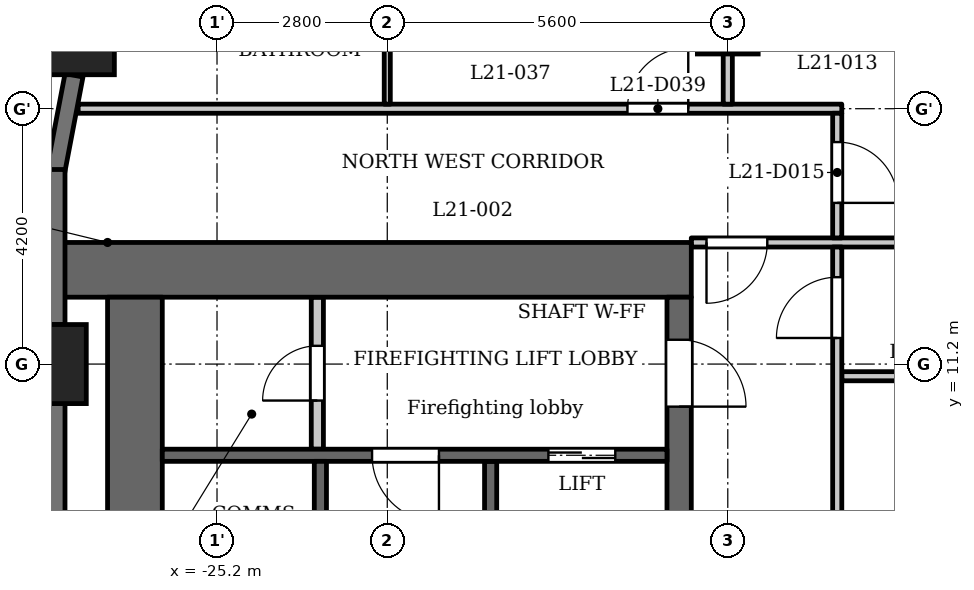
"""IFC4 building model, lengths in metres.
Left out: names, types, materials, properties, quantities, classifications, styles, units other than length and angle.
Written with IfcOpenShell. Run it as: python <this file> out.ifc"""

import sys

from ifc_helpers import new_model, si_unit, direction, frame, frame_2d, origin, origin_2d, place, context, subcontext, project, spatial, rectangle, extrude, element, fill, save


model = new_model("IFC4")
c1 = context("Model", 3, precision=1e-05, world=origin(), true_north=direction((0.0, 1.0)))
c2 = subcontext(c1, "Body", "Model", "MODEL_VIEW")
j1 = project(units=[si_unit("LENGTHUNIT", "METRE"), si_unit("PLANEANGLEUNIT", "RADIAN")], contexts=[c1])
p1 = place(None, origin())
s1 = spatial("IfcSite", under=j1, at=p1, CompositionType="ELEMENT")
p2 = place(p1, origin())
s2 = spatial("IfcBuilding", under=s1, at=p2, CompositionType="ELEMENT")
p3 = place(p2, frame((0.0, 0.0, 86.8)))
s3 = spatial("IfcBuildingStorey", under=s2, at=p3, CompositionType="ELEMENT", Elevation=86.8)
for number, where, z_axis, x_axis in (
    (1, (-27.538, 16.609, 0.0), (0.0, 0.0, 1.0), (1.0, 0.0, 0.0)),
    (2, (-28.0, 11.2, 0.0), (0.0, 0.0, 1.0), (1.0, 0.0, 0.0)),
):
    element("IfcColumn", number, at=place(p3, frame(where, z_axis=z_axis, x_axis=x_axis)), inside=s3, PredefinedType="COLUMN", context=c2, shape_type="SweptSolid", body=[
        extrude(rectangle(XDim=1.3, YDim=1.3, at=origin_2d()), origin(), (0.0, 0.0, 1.0), 3.5),
    ])
p4 = place(p3, frame((-16.8, 16.8, 0.0), z_axis=(0.0, 0.0, 1.0), x_axis=(1.0, 0.0, 0.0)))
e3 = element("IfcColumn", 3, at=p4, inside=s3, PredefinedType="COLUMN", context=c2, shape_type="SweptSolid", body=[
    extrude(rectangle(XDim=1.0, YDim=1.0, at=origin_2d()), origin(), (0.0, 0.0, 1.0), 3.5),
])
p5 = place(p3, frame((-27.552, 15.949, 0.0), z_axis=(0.0, 0.0, 1.0), x_axis=(-0.187279751651, -0.982306619453, 0.0)))
e4 = element("IfcWall", 4, at=p5, inside=s3, PredefinedType="SOLIDWALL", context=c2, shape_type="SweptSolid", body=[
    extrude(rectangle(XDim=1.606, YDim=0.3, at=frame_2d((0.803, 0.0))), origin(), (0.0, 0.0, 1.0), 2.4),
])
p6 = place(p3, frame((-27.85, 14.4, 0.0), z_axis=(0.0, 0.0, 1.0), x_axis=(0.0, -1.0, 0.0)))
e5 = element("IfcWall", 5, at=p6, inside=s3, PredefinedType="SOLIDWALL", context=c2, shape_type="SweptSolid", body=[
    extrude(rectangle(XDim=2.55, YDim=0.3, at=frame_2d((1.275, 0.0))), origin(), (0.0, 0.0, 1.0), 2.4),
])
p7 = place(p3, frame((-27.85, 10.55, 0.0), z_axis=(0.0, 0.0, 1.0), x_axis=(0.0, -1.0, 0.0)))
e6 = element("IfcWall", 6, at=p7, inside=s3, PredefinedType="SOLIDWALL", context=c2, shape_type="SweptSolid", body=[
    extrude(rectangle(XDim=4.3, YDim=0.3, at=frame_2d((2.15, 0.0))), origin(), (0.0, 0.0, 1.0), 2.4),
])
p8 = place(p3, frame((-20.7, 2.6, 0.0), z_axis=(0.0, 0.0, 1.0), x_axis=(0.0, 1.0, 0.0)))
e7 = element("IfcWall", 7, at=p8, inside=s3, PredefinedType="SHEAR", context=c2, shape_type="SweptSolid", body=[
    extrude(rectangle(XDim=7.0, YDim=0.2, at=frame_2d((3.5, 0.0))), origin(), (0.0, 0.0, 1.0), 3.2),
])
p9 = place(p3, frame((-17.4, 12.75, 0.0), z_axis=(0.0, 0.0, 1.0), x_axis=(-1.0, 0.0, 0.0)))
e8 = element("IfcWall", 8, at=p9, inside=s3, PredefinedType="SHEAR", context=c2, shape_type="SweptSolid", body=[
    extrude(rectangle(XDim=10.4, YDim=0.9, at=frame_2d((5.2, 0.0))), origin(), (0.0, 0.0, 1.0), 3.2),
])
p10 = place(p3, frame((-17.6, -12.3, 0.0), z_axis=(0.0, 0.0, 1.0), x_axis=(0.0, 1.0, 0.0)))
e9 = element("IfcWall", 9, at=p10, inside=s3, PredefinedType="SHEAR", context=c2, shape_type="SweptSolid", body=[
    extrude(rectangle(XDim=24.6, YDim=0.4, at=frame_2d((12.3, 0.0))), origin(), (0.0, 0.0, 1.0), 3.2),
])
p11 = place(p10, frame((6.0, 0.0, 0.0)))
e10 = element("IfcOpeningElement", 10, at=p11, cuts=e9, PredefinedType="OPENING", context=c2, shape_type="SweptSolid", body=[
    extrude(rectangle(XDim=1.1, YDim=2.1, at=frame_2d((0.55, 1.05))), frame((0.0, 0.21, 0.0), z_axis=(0.0, -1.0, 0.0), x_axis=(1.0, 0.0, 0.0)), (0.0, 0.0, 1.0), 0.42),
])
p12 = place(p10, frame((8.4, 0.0, 0.0)))
e11 = element("IfcOpeningElement", 11, at=p12, cuts=e9, PredefinedType="OPENING", context=c2, shape_type="SweptSolid", body=[
    extrude(rectangle(XDim=1.1, YDim=2.1, at=frame_2d((0.55, 1.05))), frame((0.0, 0.21, 0.0), z_axis=(0.0, -1.0, 0.0), x_axis=(1.0, 0.0, 0.0)), (0.0, 0.0, 1.0), 0.42),
])
p13 = place(p10, frame((10.8, 0.0, 0.0)))
e12 = element("IfcOpeningElement", 12, at=p13, cuts=e9, PredefinedType="OPENING", context=c2, shape_type="SweptSolid", body=[
    extrude(rectangle(XDim=1.1, YDim=2.1, at=frame_2d((0.55, 1.05))), frame((0.0, 0.21, 0.0), z_axis=(0.0, -1.0, 0.0), x_axis=(1.0, 0.0, 0.0)), (0.0, 0.0, 1.0), 0.42),
])
p14 = place(p10, frame((16.75, 0.0, 0.0)))
e13 = element("IfcOpeningElement", 13, at=p14, cuts=e9, PredefinedType="OPENING", context=c2, shape_type="SweptSolid", body=[
    extrude(rectangle(XDim=0.9, YDim=2.1, at=frame_2d((0.45, 1.05))), frame((0.0, 0.21, 0.0), z_axis=(0.0, -1.0, 0.0), x_axis=(1.0, 0.0, 0.0)), (0.0, 0.0, 1.0), 0.42),
])
p15 = place(p10, frame((22.8, 0.0, 0.0)))
e14 = element("IfcOpeningElement", 14, at=p15, cuts=e9, PredefinedType="OPENING", context=c2, shape_type="SweptSolid", body=[
    extrude(rectangle(XDim=1.1, YDim=2.1, at=frame_2d((0.55, 1.05))), frame((0.0, 0.21, 0.0), z_axis=(0.0, -1.0, 0.0), x_axis=(1.0, 0.0, 0.0)), (0.0, 0.0, 1.0), 0.42),
])
p16 = place(p10, frame((0.7, 0.0, 0.0)))
e15 = element("IfcOpeningElement", 15, at=p16, cuts=e9, PredefinedType="OPENING", context=c2, shape_type="SweptSolid", body=[
    extrude(rectangle(XDim=1.1, YDim=2.1, at=frame_2d((0.55, 1.05))), frame((0.0, 0.21, 0.0), z_axis=(0.0, -1.0, 0.0), x_axis=(1.0, 0.0, 0.0)), (0.0, 0.0, 1.0), 0.42),
])
p17 = place(p10, frame((12.775, 0.0, 0.0)))
e16 = element("IfcOpeningElement", 16, at=p17, cuts=e9, PredefinedType="OPENING", context=c2, shape_type="SweptSolid", body=[
    extrude(rectangle(XDim=1.8, YDim=2.1, at=frame_2d((0.9, 1.05))), frame((0.0, 0.21, 0.0), z_axis=(0.0, -1.0, 0.0), x_axis=(1.0, 0.0, 0.0)), (0.0, 0.0, 1.0), 0.42),
])
p18 = place(p3, frame((-26.55, -12.3, 0.0), z_axis=(0.0, 0.0, 1.0), x_axis=(0.0, 1.0, 0.0)))
e17 = element("IfcWall", 17, at=p18, inside=s3, PredefinedType="SHEAR", context=c2, shape_type="SweptSolid", body=[
    extrude(rectangle(XDim=24.6, YDim=0.9, at=frame_2d((12.3, 0.0))), origin(), (0.0, 0.0, 1.0), 3.2),
])
p19 = place(p3, frame((-23.55, 9.8, 0.0), z_axis=(0.0, 0.0, 1.0), x_axis=(0.0, 1.0, 0.0)))
e18 = element("IfcWall", 18, at=p19, inside=s3, PredefinedType="PARTITIONING", context=c2, shape_type="SweptSolid", body=[
    extrude(rectangle(XDim=2.5, YDim=0.2, at=frame_2d((1.25, 0.0))), origin(), (0.0, 0.0, 1.0), 3.2),
])
p20 = place(p19, frame((0.8, 0.0, 0.0)))
e19 = element("IfcOpeningElement", 19, at=p20, cuts=e18, PredefinedType="OPENING", context=c2, shape_type="SweptSolid", body=[
    extrude(rectangle(XDim=0.9, YDim=2.1, at=frame_2d((0.45, 1.05))), frame((0.0, 0.11, 0.0), z_axis=(0.0, -1.0, 0.0), x_axis=(1.0, 0.0, 0.0)), (0.0, 0.0, 1.0), 0.22),
])
p21 = place(p3, frame((-17.8, 9.7, 0.0), z_axis=(0.0, 0.0, 1.0), x_axis=(-1.0, 0.0, 0.0)))
e20 = element("IfcWall", 20, at=p21, inside=s3, PredefinedType="SHEAR", context=c2, shape_type="SweptSolid", body=[
    extrude(rectangle(XDim=8.3, YDim=0.2, at=frame_2d((4.15, 0.0))), origin(), (0.0, 0.0, 1.0), 3.2),
])
p22 = place(p21, frame((0.85, 0.0, 0.0)))
e21 = element("IfcOpeningElement", 21, at=p22, cuts=e20, PredefinedType="OPENING", context=c2, shape_type="SweptSolid", body=[
    extrude(rectangle(XDim=1.1, YDim=2.1, at=frame_2d((0.55, 1.05))), frame((0.0, 0.11, 0.0), z_axis=(0.0, -1.0, 0.0), x_axis=(1.0, 0.0, 0.0)), (0.0, 0.0, 1.0), 0.22),
])
p23 = place(p21, frame((3.75, 0.0, 0.0)))
e22 = element("IfcOpeningElement", 22, at=p23, cuts=e20, PredefinedType="OPENING", context=c2, shape_type="SweptSolid", body=[
    extrude(rectangle(XDim=1.1, YDim=2.1, at=frame_2d((0.55, 1.05))), frame((0.0, 0.11, 0.0), z_axis=(0.0, -1.0, 0.0), x_axis=(1.0, 0.0, 0.0)), (0.0, 0.0, 1.0), 0.22),
])
p24 = place(p3, frame((-23.5, 2.6, 0.0), z_axis=(0.0, 0.0, 1.0), x_axis=(0.0, 1.0, 0.0)))
e23 = element("IfcWall", 23, at=p24, inside=s3, PredefinedType="SHEAR", context=c2, shape_type="SweptSolid", body=[
    extrude(rectangle(XDim=7.0, YDim=0.2, at=frame_2d((3.5, 0.0))), origin(), (0.0, 0.0, 1.0), 3.2),
])
p25 = place(p3, frame((-14.925, 11.0, 0.0), z_axis=(0.0, 0.0, 1.0), x_axis=(1.0, 0.0, 0.0)))
e24 = element("IfcWall", 24, at=p25, inside=s3, PredefinedType="PARTITIONING", context=c2, shape_type="SweptSolid", body=[
    extrude(rectangle(XDim=29.85, YDim=0.15, at=frame_2d((14.925, 0.0))), origin(), (0.0, 0.0, 1.0), 3.2),
])
p26 = place(p25, frame((1.076, 0.0, 0.0)))
e25 = element("IfcOpeningElement", 25, at=p26, cuts=e24, PredefinedType="OPENING", context=c2, shape_type="SweptSolid", body=[
    extrude(rectangle(XDim=1.0, YDim=2.1, at=frame_2d((0.5, 1.05))), frame((0.0, 0.085, 0.0), z_axis=(0.0, -1.0, 0.0), x_axis=(1.0, 0.0, 0.0)), (0.0, 0.0, 1.0), 0.17),
])
p27 = place(p25, frame((7.625, 0.0, 0.0)))
e26 = element("IfcOpeningElement", 26, at=p27, cuts=e24, PredefinedType="OPENING", context=c2, shape_type="SweptSolid", body=[
    extrude(rectangle(XDim=1.0, YDim=2.1, at=frame_2d((0.5, 1.05))), frame((0.0, 0.085, 0.0), z_axis=(0.0, -1.0, 0.0), x_axis=(1.0, 0.0, 0.0)), (0.0, 0.0, 1.0), 0.17),
])
p28 = place(p25, frame((9.975, 0.0, 0.0)))
e27 = element("IfcOpeningElement", 27, at=p28, cuts=e24, PredefinedType="OPENING", context=c2, shape_type="SweptSolid", body=[
    extrude(rectangle(XDim=1.0, YDim=2.1, at=frame_2d((0.5, 1.05))), frame((0.0, 0.085, 0.0), z_axis=(0.0, -1.0, 0.0), x_axis=(1.0, 0.0, 0.0)), (0.0, 0.0, 1.0), 0.17),
])
p29 = place(p25, frame((18.825, 0.0, 0.0)))
e28 = element("IfcOpeningElement", 28, at=p29, cuts=e24, PredefinedType="OPENING", context=c2, shape_type="SweptSolid", body=[
    extrude(rectangle(XDim=1.0, YDim=2.1, at=frame_2d((0.5, 1.05))), frame((0.0, 0.085, 0.0), z_axis=(0.0, -1.0, 0.0), x_axis=(1.0, 0.0, 0.0)), (0.0, 0.0, 1.0), 0.17),
])
p30 = place(p25, frame((21.175, 0.0, 0.0)))
e29 = element("IfcOpeningElement", 29, at=p30, cuts=e24, PredefinedType="OPENING", context=c2, shape_type="SweptSolid", body=[
    extrude(rectangle(XDim=1.0, YDim=2.1, at=frame_2d((0.5, 1.05))), frame((0.0, 0.085, 0.0), z_axis=(0.0, -1.0, 0.0), x_axis=(1.0, 0.0, 0.0)), (0.0, 0.0, 1.0), 0.17),
])
p31 = place(p25, frame((27.775, 0.0, 0.0)))
e30 = element("IfcOpeningElement", 30, at=p31, cuts=e24, PredefinedType="OPENING", context=c2, shape_type="SweptSolid", body=[
    extrude(rectangle(XDim=1.0, YDim=2.1, at=frame_2d((0.5, 1.05))), frame((0.0, 0.085, 0.0), z_axis=(0.0, -1.0, 0.0), x_axis=(1.0, 0.0, 0.0)), (0.0, 0.0, 1.0), 0.17),
])
p32 = place(p3, frame((-17.4, 13.2, 0.0), z_axis=(0.0, 0.0, 1.0), x_axis=(1.0, 0.0, 0.0)))
e31 = element("IfcWall", 31, at=p32, inside=s3, PredefinedType="PARTITIONING", context=c2, shape_type="SweptSolid", body=[
    extrude(rectangle(XDim=34.8, YDim=0.15, at=frame_2d((17.4, 0.0))), origin(), (0.0, 0.0, 1.0), 3.2),
])
p33 = place(p32, frame((0.25, 0.0, 0.0)))
e32 = element("IfcOpeningElement", 32, at=p33, cuts=e31, PredefinedType="OPENING", context=c2, shape_type="SweptSolid", body=[
    extrude(rectangle(XDim=1.0, YDim=2.1, at=frame_2d((0.5, 1.05))), frame((0.0, 0.085, 0.0), z_axis=(0.0, -1.0, 0.0), x_axis=(1.0, 0.0, 0.0)), (0.0, 0.0, 1.0), 0.17),
])
p34 = place(p32, frame((33.65, 0.0, 0.0)))
e33 = element("IfcOpeningElement", 33, at=p34, cuts=e31, PredefinedType="OPENING", context=c2, shape_type="SweptSolid", body=[
    extrude(rectangle(XDim=1.0, YDim=2.1, at=frame_2d((0.5, 1.05))), frame((0.0, 0.085, 0.0), z_axis=(0.0, -1.0, 0.0), x_axis=(1.0, 0.0, 0.0)), (0.0, 0.0, 1.0), 0.17),
])
p35 = place(p32, frame((15.75, 0.0, 0.0)))
e34 = element("IfcOpeningElement", 34, at=p35, cuts=e31, PredefinedType="OPENING", context=c2, shape_type="SweptSolid", body=[
    extrude(rectangle(XDim=1.0, YDim=2.1, at=frame_2d((0.5, 1.05))), frame((0.0, 0.085, 0.0), z_axis=(0.0, -1.0, 0.0), x_axis=(1.0, 0.0, 0.0)), (0.0, 0.0, 1.0), 0.17),
])
p36 = place(p32, frame((21.35, 0.0, 0.0)))
e35 = element("IfcOpeningElement", 35, at=p36, cuts=e31, PredefinedType="OPENING", context=c2, shape_type="SweptSolid", body=[
    extrude(rectangle(XDim=1.0, YDim=2.1, at=frame_2d((0.5, 1.05))), frame((0.0, 0.085, 0.0), z_axis=(0.0, -1.0, 0.0), x_axis=(1.0, 0.0, 0.0)), (0.0, 0.0, 1.0), 0.17),
])
p37 = place(p3, frame((-27.484, 15.4, 0.0), z_axis=(0.0, 0.0, 1.0), x_axis=(1.0, 0.0, 0.0)))
e36 = element("IfcWall", 36, at=p37, inside=s3, PredefinedType="PARTITIONING", context=c2, shape_type="SweptSolid", body=[
    extrude(rectangle(XDim=12.559, YDim=0.15, at=frame_2d((6.279, 0.0))), origin(), (0.0, 0.0, 1.0), 3.2),
])
p38 = place(p37, frame((9.034, 0.0, 0.0)))
e37 = element("IfcOpeningElement", 37, at=p38, cuts=e36, PredefinedType="OPENING", context=c2, shape_type="SweptSolid", body=[
    extrude(rectangle(XDim=1.0, YDim=2.1, at=frame_2d((0.5, 1.05))), frame((0.0, 0.085, 0.0), z_axis=(0.0, -1.0, 0.0), x_axis=(1.0, 0.0, 0.0)), (0.0, 0.0, 1.0), 0.17),
])
p39 = place(p3, frame((-22.4, 15.475, 0.0), z_axis=(0.0, 0.0, 1.0), x_axis=(0.0, 1.0, 0.0)))
e38 = element("IfcWall", 38, at=p39, inside=s3, PredefinedType="PARTITIONING", context=c2, shape_type="SweptSolid", body=[
    extrude(rectangle(XDim=2.275, YDim=0.1, at=frame_2d((1.137, 0.0))), origin(), (0.0, 0.0, 1.0), 3.2),
])
p40 = place(p3, frame((-16.8, 15.475, 0.0), z_axis=(0.0, 0.0, 1.0), x_axis=(0.0, 1.0, 0.0)))
e39 = element("IfcWall", 39, at=p40, inside=s3, PredefinedType="PARTITIONING", context=c2, shape_type="SweptSolid", body=[
    extrude(rectangle(XDim=7.555, YDim=0.15, at=frame_2d((3.777, 0.0))), origin(), (0.0, 0.0, 1.0), 3.2),
])
p41 = place(p3, frame((-15.0, 6.769, 0.0), z_axis=(0.0, 0.0, 1.0), x_axis=(0.0, 1.0, 0.0)))
e40 = element("IfcWall", 40, at=p41, inside=s3, PredefinedType="PARTITIONING", context=c2, shape_type="SweptSolid", body=[
    extrude(rectangle(XDim=6.356, YDim=0.15, at=frame_2d((3.178, 0.0))), origin(), (0.0, 0.0, 1.0), 3.2),
])
p42 = place(p41, frame((4.86, 0.0, 0.0)))
e41 = element("IfcOpeningElement", 41, at=p42, cuts=e40, PredefinedType="OPENING", context=c2, shape_type="SweptSolid", body=[
    extrude(rectangle(XDim=1.0, YDim=2.1, at=frame_2d((0.5, 1.05))), frame((0.0, 0.085, 0.0), z_axis=(0.0, -1.0, 0.0), x_axis=(1.0, 0.0, 0.0)), (0.0, 0.0, 1.0), 0.17),
])
p43 = place(p3, frame((-15.0, 13.275, 0.0), z_axis=(0.0, 0.0, 1.0), x_axis=(0.0, 1.0, 0.0)))
e42 = element("IfcWall", 42, at=p43, inside=s3, PredefinedType="PARTITIONING", context=c2, shape_type="SweptSolid", body=[
    extrude(rectangle(XDim=2.05, YDim=0.15, at=frame_2d((1.025, 0.0))), origin(), (0.0, 0.0, 1.0), 3.2),
])
p44 = place(p43, frame((0.576, 0.0, 0.0)))
e43 = element("IfcOpeningElement", 43, at=p44, cuts=e42, PredefinedType="OPENING", context=c2, shape_type="SweptSolid", body=[
    extrude(rectangle(XDim=1.0, YDim=2.1, at=frame_2d((0.5, 1.05))), frame((0.0, 0.085, 0.0), z_axis=(0.0, -1.0, 0.0), x_axis=(1.0, 0.0, 0.0)), (0.0, 0.0, 1.0), 0.17),
])
p45 = place(p22, origin())
e44 = element("IfcDoor", 44, at=p45, inside=s3, OperationType="DOUBLE_DOOR_SLIDING", PredefinedType="DOOR", context=c2, shape_type="SweptSolid", body=[
    extrude(rectangle(XDim=1.1, YDim=2.1, at=frame_2d((0.55, 1.05))), frame((0.0, 0.025, 0.0), z_axis=(0.0, -1.0, 0.0), x_axis=(1.0, 0.0, 0.0)), (0.0, 0.0, 1.0), 0.05),
])
fill(e21, e44)
p46 = place(p15, origin())
e45 = element("IfcDoor", 45, at=p46, inside=s3, OperationType="SINGLE_SWING_LEFT", PredefinedType="DOOR", context=c2, shape_type="SweptSolid", body=[
    extrude(rectangle(XDim=1.1, YDim=2.1, at=frame_2d((0.55, 1.05))), frame((0.0, 0.025, 0.0), z_axis=(0.0, -1.0, 0.0), x_axis=(1.0, 0.0, 0.0)), (0.0, 0.0, 1.0), 0.05),
])
fill(e14, e45)
p47 = place(p20, origin())
e46 = element("IfcDoor", 46, at=p47, inside=s3, OperationType="SINGLE_SWING_RIGHT", PredefinedType="DOOR", context=c2, shape_type="SweptSolid", body=[
    extrude(rectangle(XDim=0.9, YDim=2.1, at=frame_2d((0.45, 1.05))), frame((0.0, 0.025, 0.0), z_axis=(0.0, -1.0, 0.0), x_axis=(1.0, 0.0, 0.0)), (0.0, 0.0, 1.0), 0.05),
])
fill(e19, e46)
p48 = place(p23, origin())
e47 = element("IfcDoor", 47, at=p48, inside=s3, OperationType="SINGLE_SWING_RIGHT", PredefinedType="DOOR", context=c2, shape_type="SweptSolid", body=[
    extrude(rectangle(XDim=1.1, YDim=2.1, at=frame_2d((0.55, 1.05))), frame((0.0, 0.025, 0.0), z_axis=(0.0, -1.0, 0.0), x_axis=(1.0, 0.0, 0.0)), (0.0, 0.0, 1.0), 0.05),
])
fill(e22, e47)
p49 = place(p42, origin())
e48 = element("IfcDoor", 48, at=p49, inside=s3, OperationType="SINGLE_SWING_RIGHT", PredefinedType="DOOR", context=c2, shape_type="SweptSolid", body=[
    extrude(rectangle(XDim=1.0, YDim=2.1, at=frame_2d((0.5, 1.05))), frame((0.0, 0.025, 0.0), z_axis=(0.0, -1.0, 0.0), x_axis=(1.0, 0.0, 0.0)), (0.0, 0.0, 1.0), 0.05),
])
fill(e41, e48)
p50 = place(p33, origin())
e49 = element("IfcDoor", 49, at=p50, inside=s3, OperationType="SINGLE_SWING_LEFT", PredefinedType="DOOR", context=c2, shape_type="SweptSolid", body=[
    extrude(rectangle(XDim=1.0, YDim=2.1, at=frame_2d((0.5, 1.05))), frame((0.0, 0.025, 0.0), z_axis=(0.0, -1.0, 0.0), x_axis=(1.0, 0.0, 0.0)), (0.0, 0.0, 1.0), 0.05),
])
fill(e32, e49)
p51 = place(p44, origin())
e50 = element("IfcDoor", 50, at=p51, inside=s3, OperationType="SINGLE_SWING_LEFT", PredefinedType="DOOR", context=c2, shape_type="SweptSolid", body=[
    extrude(rectangle(XDim=1.0, YDim=2.1, at=frame_2d((0.5, 1.05))), frame((0.0, 0.025, 0.0), z_axis=(0.0, -1.0, 0.0), x_axis=(1.0, 0.0, 0.0)), (0.0, 0.0, 1.0), 0.05),
])
fill(e43, e50)
p52 = place(p38, origin())
e51 = element("IfcDoor", 51, at=p52, inside=s3, OperationType="SINGLE_SWING_LEFT", PredefinedType="DOOR", context=c2, shape_type="SweptSolid", body=[
    extrude(rectangle(XDim=1.0, YDim=2.1, at=frame_2d((0.5, 1.05))), frame((0.0, 0.025, 0.0), z_axis=(0.0, -1.0, 0.0), x_axis=(1.0, 0.0, 0.0)), (0.0, 0.0, 1.0), 0.05),
])
fill(e37, e51)
save(model, sys.argv[1])
